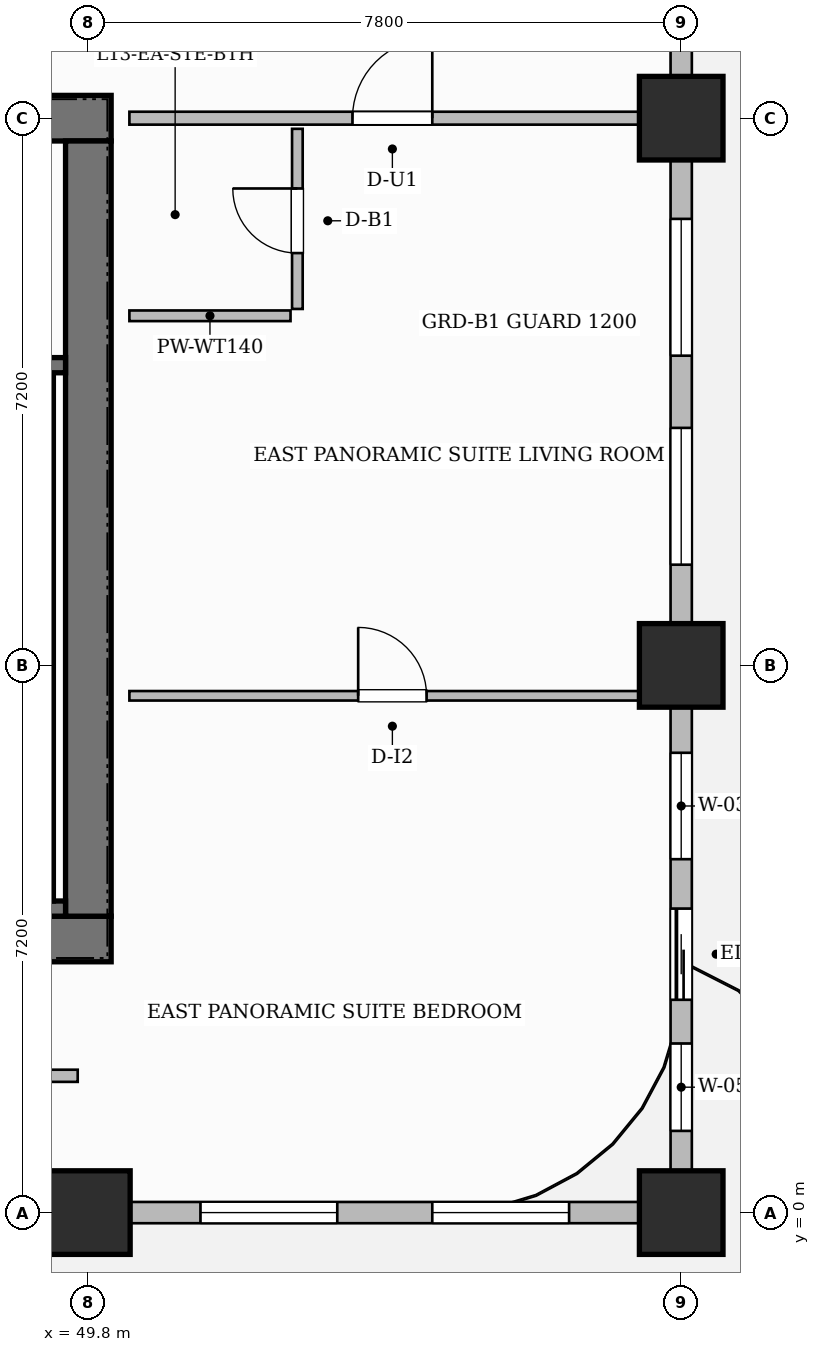
"""IFC4 building model, lengths in metres.
Left out: names, types, materials, properties, quantities, classifications, styles, units other than length and angle.
Written with IfcOpenShell. Run it as: python <this file> out.ifc"""

import sys

from ifc_helpers import new_model, si_unit, direction, frame, frame_2d, origin, origin_2d, place, context, subcontext, project, spatial, rectangle, extrude, source, transform, mapped, element, fill, save


model = new_model("IFC4")
c1 = context("Model", 3, precision=1e-05, world=origin(), true_north=direction((0.0, 1.0)))
c2 = subcontext(c1, "Body", "Model", "MODEL_VIEW")
j1 = project(units=[si_unit("LENGTHUNIT", "METRE"), si_unit("PLANEANGLEUNIT", "RADIAN")], contexts=[c1])
p1 = place(None, origin())
s1 = spatial("IfcSite", under=j1, at=p1, CompositionType="ELEMENT")
p2 = place(p1, origin())
s2 = spatial("IfcBuilding", under=s1, at=p2, CompositionType="ELEMENT")
p3 = place(p2, frame((0.0, 0.0, 58.3)))
s3 = spatial("IfcBuildingStorey", under=s2, at=p3, CompositionType="ELEMENT", Elevation=58.3)
p4 = place(p3, frame((34.5, 3.6, 0.0), z_axis=(0.0, 0.0, 1.0), x_axis=(1.0, 0.0, 0.0)))
e1 = element("IfcWall", 1, at=p4, inside=s3, PredefinedType="SHEAR", context=c2, shape_type="SweptSolid", body=[
    extrude(rectangle(XDim=15.6, YDim=0.6, at=frame_2d((7.8, 0.0))), origin(), (0.0, 0.0, 1.0), 3.7),
])
p5 = place(p4, frame((4.85, 0.0, 0.0)))
e2 = element("IfcOpeningElement", 2, at=p5, cuts=e1, PredefinedType="OPENING", context=c2, shape_type="SweptSolid", body=[
    extrude(rectangle(XDim=0.9, YDim=2.1, at=frame_2d((0.45, 1.05))), frame((0.0, 0.31, 0.0), z_axis=(0.0, -1.0, 0.0), x_axis=(1.0, 0.0, 0.0)), (0.0, 0.0, 1.0), 0.62),
])
p6 = place(p4, frame((7.27, 0.0, 0.0)))
e3 = element("IfcOpeningElement", 3, at=p6, cuts=e1, PredefinedType="OPENING", context=c2, shape_type="SweptSolid", body=[
    extrude(rectangle(XDim=0.9, YDim=2.1, at=frame_2d((0.45, 1.05))), frame((0.0, 0.31, 0.0), z_axis=(0.0, -1.0, 0.0), x_axis=(1.0, 0.0, 0.0)), (0.0, 0.0, 1.0), 0.62),
])
p7 = place(p3, frame((34.5, 14.4, 0.0), z_axis=(0.0, 0.0, 1.0), x_axis=(1.0, 0.0, 0.0)))
e4 = element("IfcWall", 4, at=p7, inside=s3, PredefinedType="SHEAR", context=c2, shape_type="SweptSolid", body=[
    extrude(rectangle(XDim=15.6, YDim=0.6, at=frame_2d((7.8, 0.0))), origin(), (0.0, 0.0, 1.0), 3.7),
])
p8 = place(p7, frame((5.43, 0.0, 0.0)))
e5 = element("IfcOpeningElement", 5, at=p8, cuts=e4, PredefinedType="OPENING", context=c2, shape_type="SweptSolid", body=[
    extrude(rectangle(XDim=1.5, YDim=2.2, at=frame_2d((0.75, 1.1))), frame((0.0, 0.31, 0.0), z_axis=(0.0, -1.0, 0.0), x_axis=(1.0, 0.0, 0.0)), (0.0, 0.0, 1.0), 0.62),
])
p9 = place(p7, frame((1.645, 0.0, 0.0)))
e6 = element("IfcOpeningElement", 6, at=p9, cuts=e4, PredefinedType="OPENING", context=c2, shape_type="SweptSolid", body=[
    extrude(rectangle(XDim=1.05, YDim=2.15, at=frame_2d((0.525, 1.075))), frame((0.0, 0.31, 0.0), z_axis=(0.0, -1.0, 0.0), x_axis=(1.0, 0.0, 0.0)), (0.0, 0.0, 1.0), 0.62),
])
p10 = place(p7, frame((11.275, 0.0, 0.0)))
e7 = element("IfcOpeningElement", 7, at=p10, cuts=e4, PredefinedType="OPENING", context=c2, shape_type="SweptSolid", body=[
    extrude(rectangle(XDim=1.05, YDim=2.15, at=frame_2d((0.525, 1.075))), frame((0.0, 0.31, 0.0), z_axis=(0.0, -1.0, 0.0), x_axis=(1.0, 0.0, 0.0)), (0.0, 0.0, 1.0), 0.62),
])
p11 = place(p3, frame((49.8, 3.9, 0.0), z_axis=(0.0, 0.0, 1.0), x_axis=(0.0, 1.0, 0.0)))
e8 = element("IfcWall", 8, at=p11, inside=s3, PredefinedType="SHEAR", context=c2, shape_type="SweptSolid", body=[
    extrude(rectangle(XDim=10.2, YDim=0.6, at=frame_2d((5.1, 0.0))), origin(), (0.0, 0.0, 1.0), 3.7),
])
m1 = source(origin(), c2, "Body", "SweptSolid", [
    extrude(rectangle(XDim=1.1, YDim=1.1, at=origin_2d()), origin(), (0.0, 0.0, 1.0), 3.7),
])
for number, where, z_axis, x_axis in (
    (9, (49.8, 0.0, 0.0), (0.0, 0.0, 1.0), (1.0, 0.0, 0.0)),
    (10, (57.6, 0.0, 0.0), (0.0, 0.0, 1.0), (1.0, 0.0, 0.0)),
    (11, (57.6, 7.2, 0.0), (0.0, 0.0, 1.0), (1.0, 0.0, 0.0)),
    (12, (57.6, 14.4, 0.0), (0.0, 0.0, 1.0), (1.0, 0.0, 0.0)),
):
    element("IfcColumn", number, at=place(p3, frame(where, z_axis=z_axis, x_axis=x_axis)), inside=s3, PredefinedType="COLUMN", context=c2, shape_type="MappedRepresentation", body=[
        mapped(m1, transform((0.0, 0.0, 0.0), scale=1.0)),
    ])
p12 = place(p3, frame((43.12, 4.0, 0.0), z_axis=(0.0, 0.0, 1.0), x_axis=(1.0, 0.0, 0.0)))
e13 = element("IfcWall", 13, at=p12, inside=s3, PredefinedType="SHEAR", context=c2, shape_type="SweptSolid", body=[
    extrude(rectangle(XDim=6.38, YDim=0.2, at=frame_2d((3.19, 0.0))), origin(), (0.0, 0.0, 1.0), 3.7),
])
p13 = place(p3, frame((49.24, 4.1, 0.0), z_axis=(0.0, 0.0, 1.0), x_axis=(0.0, 1.0, 0.0)))
e14 = element("IfcWall", 14, at=p13, inside=s3, PredefinedType="SHEAR", context=c2, shape_type="SweptSolid", body=[
    extrude(rectangle(XDim=6.95, YDim=0.2, at=frame_2d((3.475, 0.0))), origin(), (0.0, 0.0, 1.0), 3.7),
])
p14 = place(p3, frame((43.12, 11.15, 0.0), z_axis=(0.0, 0.0, 1.0), x_axis=(1.0, 0.0, 0.0)))
e15 = element("IfcWall", 15, at=p14, inside=s3, PredefinedType="SHEAR", context=c2, shape_type="SweptSolid", body=[
    extrude(rectangle(XDim=6.38, YDim=0.2, at=frame_2d((3.19, 0.0))), origin(), (0.0, 0.0, 1.0), 3.7),
])
p15 = place(p14, frame((1.045, 0.0, 0.0)))
e16 = element("IfcOpeningElement", 16, at=p15, cuts=e15, PredefinedType="OPENING", context=c2, shape_type="SweptSolid", body=[
    extrude(rectangle(XDim=1.05, YDim=2.2, at=frame_2d((0.525, 1.1))), frame((0.0, 0.11, 0.0), z_axis=(0.0, -1.0, 0.0), x_axis=(1.0, 0.0, 0.0)), (0.0, 0.0, 1.0), 0.22),
])
p16 = place(p14, frame((4.125, 0.0, 0.0)))
e17 = element("IfcOpeningElement", 17, at=p16, cuts=e15, PredefinedType="OPENING", context=c2, shape_type="SweptSolid", body=[
    extrude(rectangle(XDim=1.05, YDim=2.2, at=frame_2d((0.525, 1.1))), frame((0.0, 0.11, 0.0), z_axis=(0.0, -1.0, 0.0), x_axis=(1.0, 0.0, 0.0)), (0.0, 0.0, 1.0), 0.22),
])
p17 = place(p3, frame((30.29, 1.8, 0.0), z_axis=(0.0, 0.0, 1.0), x_axis=(1.0, 0.0, 0.0)))
e18 = element("IfcWall", 18, at=p17, inside=s3, PredefinedType="PARTITIONING", context=c2, shape_type="SweptSolid", body=[
    extrude(rectangle(XDim=19.37, YDim=0.16, at=frame_2d((9.685, 0.0))), origin(), (0.0, 0.0, 1.0), 3.45),
])
p18 = place(p17, frame((9.735, 0.0, 0.0)))
e19 = element("IfcOpeningElement", 19, at=p18, cuts=e18, PredefinedType="OPENING", context=c2, shape_type="SweptSolid", body=[
    extrude(rectangle(XDim=0.95, YDim=2.15, at=frame_2d((0.475, 1.075))), frame((0.0, 0.09, 0.0), z_axis=(0.0, -1.0, 0.0), x_axis=(1.0, 0.0, 0.0)), (0.0, 0.0, 1.0), 0.18),
])
p19 = place(p3, frame((50.34, 14.4, 0.0), z_axis=(0.0, 0.0, 1.0), x_axis=(1.0, 0.0, 0.0)))
e20 = element("IfcWall", 20, at=p19, inside=s3, PredefinedType="PARTITIONING", context=c2, shape_type="SweptSolid", body=[
    extrude(rectangle(XDim=7.07, YDim=0.17, at=frame_2d((3.535, 0.0))), origin(), (0.0, 0.0, 1.0), 2.885),
])
p20 = place(p19, frame((2.935, 0.0, 0.0)))
e21 = element("IfcOpeningElement", 21, at=p20, cuts=e20, PredefinedType="OPENING", context=c2, shape_type="SweptSolid", body=[
    extrude(rectangle(XDim=1.05, YDim=2.25, at=frame_2d((0.525, 1.125))), frame((0.0, 0.095, 0.0), z_axis=(0.0, -1.0, 0.0), x_axis=(1.0, 0.0, 0.0)), (0.0, 0.0, 1.0), 0.19),
])
p21 = place(p3, frame((52.55, 11.89, 0.0), z_axis=(0.0, 0.0, 1.0), x_axis=(0.0, 1.0, 0.0)))
e22 = element("IfcWall", 22, at=p21, inside=s3, PredefinedType="PARTITIONING", context=c2, shape_type="SweptSolid", body=[
    extrude(rectangle(XDim=2.37, YDim=0.14, at=frame_2d((1.185, 0.0))), origin(), (0.0, 0.0, 1.0), 3.45),
])
p22 = place(p21, frame((0.735, 0.0, 0.0)))
e23 = element("IfcOpeningElement", 23, at=p22, cuts=e22, PredefinedType="OPENING", context=c2, shape_type="SweptSolid", body=[
    extrude(rectangle(XDim=0.85, YDim=2.1, at=frame_2d((0.425, 1.05))), frame((0.0, 0.08, 0.0), z_axis=(0.0, -1.0, 0.0), x_axis=(1.0, 0.0, 0.0)), (0.0, 0.0, 1.0), 0.16),
])
p23 = place(p3, frame((50.34, 11.8, 0.0), z_axis=(0.0, 0.0, 1.0), x_axis=(1.0, 0.0, 0.0)))
e24 = element("IfcWall", 24, at=p23, inside=s3, PredefinedType="PARTITIONING", context=c2, shape_type="SweptSolid", body=[
    extrude(rectangle(XDim=2.12, YDim=0.14, at=frame_2d((1.06, 0.0))), origin(), (0.0, 0.0, 1.0), 3.45),
])
p24 = place(p3, frame((50.34, 6.8, 0.0), z_axis=(0.0, 0.0, 1.0), x_axis=(1.0, 0.0, 0.0)))
e25 = element("IfcWall", 25, at=p24, inside=s3, PredefinedType="PARTITIONING", context=c2, shape_type="SweptSolid", body=[
    extrude(rectangle(XDim=7.07, YDim=0.125, at=frame_2d((3.535, 0.0))), origin(), (0.0, 0.0, 1.0), 3.45),
])
p25 = place(p24, frame((3.01, 0.0, 0.0)))
e26 = element("IfcOpeningElement", 26, at=p25, cuts=e25, PredefinedType="OPENING", context=c2, shape_type="SweptSolid", body=[
    extrude(rectangle(XDim=0.9, YDim=2.15, at=frame_2d((0.45, 1.075))), frame((0.0, 0.073, 0.0), z_axis=(0.0, -1.0, 0.0), x_axis=(1.0, 0.0, 0.0)), (0.0, 0.0, 1.0), 0.145),
])
p26 = place(p3, frame((14.4, 0.0, 0.0), z_axis=(0.0, 0.0, 1.0), x_axis=(1.0, 0.0, 0.0)))
e27 = element("IfcWall", 27, at=p26, inside=s3, PredefinedType="SOLIDWALL", context=c2, shape_type="SweptSolid", body=[
    extrude(rectangle(XDim=43.2, YDim=0.28, at=frame_2d((21.6, 0.0))), origin(), (0.0, 0.0, 1.0), 2.885),
])
p27 = place(p26, frame((1.5, 0.0, 0.0)))
e28 = element("IfcOpeningElement", 28, at=p27, cuts=e27, PredefinedType="OPENING", context=c2, shape_type="SweptSolid", body=[
    extrude(rectangle(XDim=1.2, YDim=2.2, at=frame_2d((0.6, 1.1))), frame((0.0, 0.15, 0.0), z_axis=(0.0, -1.0, 0.0), x_axis=(1.0, 0.0, 0.0)), (0.0, 0.0, 1.0), 0.3),
])
p28 = place(p26, frame((3.336, 0.0, 0.8)))
e29 = element("IfcOpeningElement", 29, at=p28, cuts=e27, PredefinedType="OPENING", context=c2, shape_type="SweptSolid", body=[
    extrude(rectangle(XDim=1.4, YDim=1.85, at=frame_2d((0.7, 0.925))), frame((0.0, 0.15, 0.0), z_axis=(0.0, -1.0, 0.0), x_axis=(1.0, 0.0, 0.0)), (0.0, 0.0, 1.0), 0.3),
])
p29 = place(p26, frame((5.269, 0.0, 0.8)))
e30 = element("IfcOpeningElement", 30, at=p29, cuts=e27, PredefinedType="OPENING", context=c2, shape_type="SweptSolid", body=[
    extrude(rectangle(XDim=0.95, YDim=1.75, at=frame_2d((0.475, 0.875))), frame((0.0, 0.15, 0.0), z_axis=(0.0, -1.0, 0.0), x_axis=(1.0, 0.0, 0.0)), (0.0, 0.0, 1.0), 0.3),
])
p30 = place(p26, frame((8.596, 0.0, 0.8)))
e31 = element("IfcOpeningElement", 31, at=p30, cuts=e27, PredefinedType="OPENING", context=c2, shape_type="SweptSolid", body=[
    extrude(rectangle(XDim=1.8, YDim=1.85, at=frame_2d((0.9, 0.925))), frame((0.0, 0.15, 0.0), z_axis=(0.0, -1.0, 0.0), x_axis=(1.0, 0.0, 0.0)), (0.0, 0.0, 1.0), 0.3),
])
p31 = place(p26, frame((11.404, 0.0, 0.8)))
e32 = element("IfcOpeningElement", 32, at=p31, cuts=e27, PredefinedType="OPENING", context=c2, shape_type="SweptSolid", body=[
    extrude(rectangle(XDim=1.8, YDim=1.85, at=frame_2d((0.9, 0.925))), frame((0.0, 0.15, 0.0), z_axis=(0.0, -1.0, 0.0), x_axis=(1.0, 0.0, 0.0)), (0.0, 0.0, 1.0), 0.3),
])
p32 = place(p26, frame((16.804, 0.0, 0.8)))
e33 = element("IfcOpeningElement", 33, at=p32, cuts=e27, PredefinedType="OPENING", context=c2, shape_type="SweptSolid", body=[
    extrude(rectangle(XDim=1.8, YDim=1.85, at=frame_2d((0.9, 0.925))), frame((0.0, 0.15, 0.0), z_axis=(0.0, -1.0, 0.0), x_axis=(1.0, 0.0, 0.0)), (0.0, 0.0, 1.0), 0.3),
])
p33 = place(p26, frame((21.725, 0.0, 0.8)))
e34 = element("IfcOpeningElement", 34, at=p33, cuts=e27, PredefinedType="OPENING", context=c2, shape_type="SweptSolid", body=[
    extrude(rectangle(XDim=1.8, YDim=1.85, at=frame_2d((0.9, 0.925))), frame((0.0, 0.15, 0.0), z_axis=(0.0, -1.0, 0.0), x_axis=(1.0, 0.0, 0.0)), (0.0, 0.0, 1.0), 0.3),
])
p34 = place(p26, frame((24.475, 0.0, 0.8)))
e35 = element("IfcOpeningElement", 35, at=p34, cuts=e27, PredefinedType="OPENING", context=c2, shape_type="SweptSolid", body=[
    extrude(rectangle(XDim=1.8, YDim=1.85, at=frame_2d((0.9, 0.925))), frame((0.0, 0.15, 0.0), z_axis=(0.0, -1.0, 0.0), x_axis=(1.0, 0.0, 0.0)), (0.0, 0.0, 1.0), 0.3),
])
p35 = place(p26, frame((29.075, 0.0, 0.8)))
e36 = element("IfcOpeningElement", 36, at=p35, cuts=e27, PredefinedType="OPENING", context=c2, shape_type="SweptSolid", body=[
    extrude(rectangle(XDim=1.8, YDim=1.85, at=frame_2d((0.9, 0.925))), frame((0.0, 0.15, 0.0), z_axis=(0.0, -1.0, 0.0), x_axis=(1.0, 0.0, 0.0)), (0.0, 0.0, 1.0), 0.3),
])
p36 = place(p26, frame((32.125, 0.0, 0.8)))
e37 = element("IfcOpeningElement", 37, at=p36, cuts=e27, PredefinedType="OPENING", context=c2, shape_type="SweptSolid", body=[
    extrude(rectangle(XDim=1.8, YDim=1.85, at=frame_2d((0.9, 0.925))), frame((0.0, 0.15, 0.0), z_axis=(0.0, -1.0, 0.0), x_axis=(1.0, 0.0, 0.0)), (0.0, 0.0, 1.0), 0.3),
])
p37 = place(p26, frame((36.875, 0.0, 0.8)))
e38 = element("IfcOpeningElement", 38, at=p37, cuts=e27, PredefinedType="OPENING", context=c2, shape_type="SweptSolid", body=[
    extrude(rectangle(XDim=1.8, YDim=1.85, at=frame_2d((0.9, 0.925))), frame((0.0, 0.15, 0.0), z_axis=(0.0, -1.0, 0.0), x_axis=(1.0, 0.0, 0.0)), (0.0, 0.0, 1.0), 0.3),
])
p38 = place(p26, frame((39.925, 0.0, 0.8)))
e39 = element("IfcOpeningElement", 39, at=p38, cuts=e27, PredefinedType="OPENING", context=c2, shape_type="SweptSolid", body=[
    extrude(rectangle(XDim=1.8, YDim=1.85, at=frame_2d((0.9, 0.925))), frame((0.0, 0.15, 0.0), z_axis=(0.0, -1.0, 0.0), x_axis=(1.0, 0.0, 0.0)), (0.0, 0.0, 1.0), 0.3),
])
p39 = place(p3, frame((57.6, 0.05, 0.0), z_axis=(0.0, 0.0, 1.0), x_axis=(0.0, 1.0, 0.0)))
e40 = element("IfcWall", 40, at=p39, inside=s3, PredefinedType="SOLIDWALL", context=c2, shape_type="SweptSolid", body=[
    extrude(rectangle(XDim=21.5, YDim=0.28, at=frame_2d((10.75, 0.0))), origin(), (0.0, 0.0, 1.0), 2.885),
])
p40 = place(p39, frame((2.75, 0.0, 0.0)))
e41 = element("IfcOpeningElement", 41, at=p40, cuts=e40, PredefinedType="OPENING", context=c2, shape_type="SweptSolid", body=[
    extrude(rectangle(XDim=1.2, YDim=2.2, at=frame_2d((0.6, 1.1))), frame((0.0, 0.15, 0.0), z_axis=(0.0, -1.0, 0.0), x_axis=(1.0, 0.0, 0.0)), (0.0, 0.0, 1.0), 0.3),
])
p41 = place(p39, frame((1.025, 0.0, 0.8)))
e42 = element("IfcOpeningElement", 42, at=p41, cuts=e40, PredefinedType="OPENING", context=c2, shape_type="SweptSolid", body=[
    extrude(rectangle(XDim=1.15, YDim=1.8, at=frame_2d((0.575, 0.9))), frame((0.0, 0.15, 0.0), z_axis=(0.0, -1.0, 0.0), x_axis=(1.0, 0.0, 0.0)), (0.0, 0.0, 1.0), 0.3),
])
p42 = place(p39, frame((4.6, 0.0, 0.8)))
e43 = element("IfcOpeningElement", 43, at=p42, cuts=e40, PredefinedType="OPENING", context=c2, shape_type="SweptSolid", body=[
    extrude(rectangle(XDim=1.4, YDim=1.85, at=frame_2d((0.7, 0.925))), frame((0.0, 0.15, 0.0), z_axis=(0.0, -1.0, 0.0), x_axis=(1.0, 0.0, 0.0)), (0.0, 0.0, 1.0), 0.3),
])
p43 = place(p39, frame((8.475, 0.0, 0.8)))
e44 = element("IfcOpeningElement", 44, at=p43, cuts=e40, PredefinedType="OPENING", context=c2, shape_type="SweptSolid", body=[
    extrude(rectangle(XDim=1.8, YDim=1.85, at=frame_2d((0.9, 0.925))), frame((0.0, 0.15, 0.0), z_axis=(0.0, -1.0, 0.0), x_axis=(1.0, 0.0, 0.0)), (0.0, 0.0, 1.0), 0.3),
])
p44 = place(p39, frame((11.225, 0.0, 0.8)))
e45 = element("IfcOpeningElement", 45, at=p44, cuts=e40, PredefinedType="OPENING", context=c2, shape_type="SweptSolid", body=[
    extrude(rectangle(XDim=1.8, YDim=1.85, at=frame_2d((0.9, 0.925))), frame((0.0, 0.15, 0.0), z_axis=(0.0, -1.0, 0.0), x_axis=(1.0, 0.0, 0.0)), (0.0, 0.0, 1.0), 0.3),
])
p45 = place(p39, frame((17.679, 0.0, 0.8)))
e46 = element("IfcOpeningElement", 46, at=p45, cuts=e40, PredefinedType="OPENING", context=c2, shape_type="SweptSolid", body=[
    extrude(rectangle(XDim=1.8, YDim=1.85, at=frame_2d((0.9, 0.925))), frame((0.0, 0.15, 0.0), z_axis=(0.0, -1.0, 0.0), x_axis=(1.0, 0.0, 0.0)), (0.0, 0.0, 1.0), 0.3),
])
m2 = source(origin(), c2, "Body", "SweptSolid", [
    extrude(rectangle(XDim=1.05, YDim=2.25, at=frame_2d((0.525, 1.125))), frame((0.0, 0.025, 0.0), z_axis=(0.0, -1.0, 0.0), x_axis=(1.0, 0.0, 0.0)), (0.0, 0.0, 1.0), 0.05),
])
p46 = place(p20, origin())
e47 = element("IfcDoor", 47, at=p46, inside=s3, OperationType="SINGLE_SWING_RIGHT", PredefinedType="DOOR", context=c2, shape_type="MappedRepresentation", body=[
    mapped(m2, transform((0.0, 0.0, 0.0), scale=1.0)),
])
fill(e21, e47)
m3 = source(origin(), c2, "Body", "SweptSolid", [
    extrude(rectangle(XDim=0.85, YDim=2.1, at=frame_2d((0.425, 1.05))), frame((0.0, 0.025, 0.0), z_axis=(0.0, -1.0, 0.0), x_axis=(1.0, 0.0, 0.0)), (0.0, 0.0, 1.0), 0.05),
])
p47 = place(p22, origin())
e48 = element("IfcDoor", 48, at=p47, inside=s3, OperationType="SINGLE_SWING_RIGHT", PredefinedType="DOOR", context=c2, shape_type="MappedRepresentation", body=[
    mapped(m3, transform((0.0, 0.0, 0.0), scale=1.0)),
])
fill(e23, e48)
m4 = source(origin(), c2, "Body", "SweptSolid", [
    extrude(rectangle(XDim=0.9, YDim=2.15, at=frame_2d((0.45, 1.075))), frame((0.0, 0.025, 0.0), z_axis=(0.0, -1.0, 0.0), x_axis=(1.0, 0.0, 0.0)), (0.0, 0.0, 1.0), 0.05),
])
p48 = place(p25, origin())
e49 = element("IfcDoor", 49, at=p48, inside=s3, OperationType="SINGLE_SWING_LEFT", PredefinedType="DOOR", context=c2, shape_type="MappedRepresentation", body=[
    mapped(m4, transform((0.0, 0.0, 0.0), scale=1.0)),
])
fill(e26, e49)
m5 = source(origin(), c2, "Body", "SweptSolid", [
    extrude(rectangle(XDim=1.2, YDim=2.2, at=frame_2d((0.6, 1.1))), frame((0.0, 0.025, 0.0), z_axis=(0.0, -1.0, 0.0), x_axis=(1.0, 0.0, 0.0)), (0.0, 0.0, 1.0), 0.05),
])
p49 = place(p40, origin())
e50 = element("IfcDoor", 50, at=p49, inside=s3, OperationType="SLIDING_TO_LEFT", PredefinedType="DOOR", context=c2, shape_type="MappedRepresentation", body=[
    mapped(m5, transform((0.0, 0.0, 0.0), scale=1.0)),
])
fill(e41, e50)
m6 = source(origin(), c2, "Body", "SweptSolid", [
    extrude(rectangle(XDim=1.8, YDim=1.85, at=frame_2d((0.9, 0.925))), frame((0.0, 0.03, 0.0), z_axis=(0.0, -1.0, 0.0), x_axis=(1.0, 0.0, 0.0)), (0.0, 0.0, 1.0), 0.06),
])
p50 = place(p37, origin())
e51 = element("IfcWindow", 51, at=p50, inside=s3, PartitioningType="DOUBLE_PANEL_VERTICAL", PredefinedType="WINDOW", context=c2, shape_type="MappedRepresentation", body=[
    mapped(m6, transform((0.0, 0.0, 0.0), scale=1.0)),
])
fill(e38, e51)
p51 = place(p38, origin())
e52 = element("IfcWindow", 52, at=p51, inside=s3, PartitioningType="DOUBLE_PANEL_VERTICAL", PredefinedType="WINDOW", context=c2, shape_type="MappedRepresentation", body=[
    mapped(m6, transform((0.0, 0.0, 0.0), scale=1.0)),
])
fill(e39, e52)
m7 = source(origin(), c2, "Body", "SweptSolid", [
    extrude(rectangle(XDim=1.15, YDim=1.8, at=frame_2d((0.575, 0.9))), frame((0.0, 0.03, 0.0), z_axis=(0.0, -1.0, 0.0), x_axis=(1.0, 0.0, 0.0)), (0.0, 0.0, 1.0), 0.06),
])
p52 = place(p41, origin())
e53 = element("IfcWindow", 53, at=p52, inside=s3, PartitioningType="SINGLE_PANEL", PredefinedType="WINDOW", context=c2, shape_type="MappedRepresentation", body=[
    mapped(m7, transform((0.0, 0.0, 0.0), scale=1.0)),
])
fill(e42, e53)
m8 = source(origin(), c2, "Body", "SweptSolid", [
    extrude(rectangle(XDim=1.4, YDim=1.85, at=frame_2d((0.7, 0.925))), frame((0.0, 0.03, 0.0), z_axis=(0.0, -1.0, 0.0), x_axis=(1.0, 0.0, 0.0)), (0.0, 0.0, 1.0), 0.06),
])
p53 = place(p42, origin())
e54 = element("IfcWindow", 54, at=p53, inside=s3, PartitioningType="SINGLE_PANEL", PredefinedType="WINDOW", context=c2, shape_type="MappedRepresentation", body=[
    mapped(m8, transform((0.0, 0.0, 0.0), scale=1.0)),
])
fill(e43, e54)
p54 = place(p43, origin())
e55 = element("IfcWindow", 55, at=p54, inside=s3, PartitioningType="DOUBLE_PANEL_VERTICAL", PredefinedType="WINDOW", context=c2, shape_type="MappedRepresentation", body=[
    mapped(m6, transform((0.0, 0.0, 0.0), scale=1.0)),
])
fill(e44, e55)
p55 = place(p44, origin())
e56 = element("IfcWindow", 56, at=p55, inside=s3, PartitioningType="DOUBLE_PANEL_VERTICAL", PredefinedType="WINDOW", context=c2, shape_type="MappedRepresentation", body=[
    mapped(m6, transform((0.0, 0.0, 0.0), scale=1.0)),
])
fill(e45, e56)
save(model, sys.argv[1])
